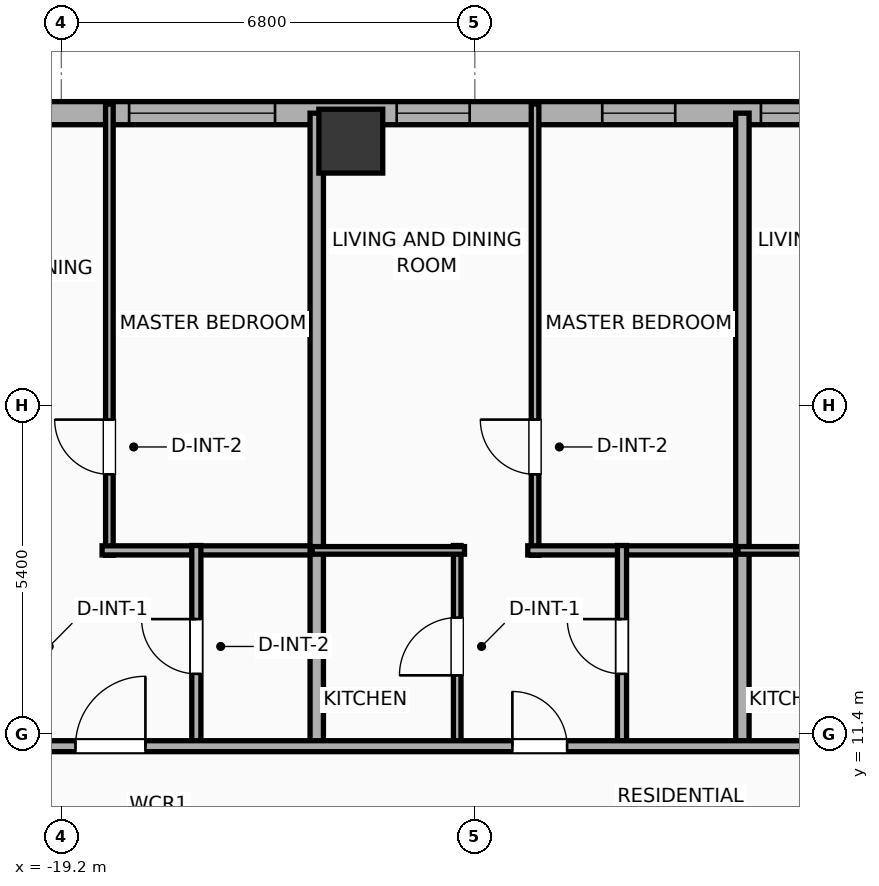
"""IFC4 building model, lengths in metres.
Left out: names, types, materials, properties, quantities, classifications, styles, units other than length and angle.
Written with IfcOpenShell. Run it as: python <this file> out.ifc"""

import sys

from ifc_helpers import new_model, si_unit, direction, frame, frame_2d, origin, origin_2d, place, context, subcontext, project, spatial, rectangle, hollow_rectangle, extrude, element, fill, save


model = new_model("IFC4")
c1 = context("Model", 3, precision=1e-05, world=origin(), true_north=direction((0.0, 1.0)))
c2 = subcontext(c1, "Body", "Model", "MODEL_VIEW")
j1 = project(units=[si_unit("LENGTHUNIT", "METRE"), si_unit("PLANEANGLEUNIT", "RADIAN")], contexts=[c1])
p1 = place(None, origin())
s1 = spatial("IfcSite", under=j1, at=p1, CompositionType="ELEMENT")
p2 = place(p1, origin())
s2 = spatial("IfcBuilding", under=s1, at=p2, CompositionType="ELEMENT")
p3 = place(p2, frame((0.0, 0.0, 120.9)))
s3 = spatial("IfcBuildingStorey", under=s2, at=p3, CompositionType="ELEMENT", Elevation=120.9)
p4 = place(p3, frame((-14.44, 21.15, 0.0), z_axis=(0.0, 0.0, 1.0), x_axis=(1.0, 0.0, 0.0)))
e1 = element("IfcColumn", 1, at=p4, inside=s3, PredefinedType="COLUMN", context=c2, shape_type="SweptSolid", body=[
    extrude(hollow_rectangle(XDim=1.05, YDim=1.05, WallThickness=0.036, at=origin_2d()), origin(), (0.0, 0.0, 1.0), 3.9),
])
p5 = place(p3, frame((-25.381, 21.61, 0.0), z_axis=(0.0, 0.0, 1.0), x_axis=(1.0, 0.0, 0.0)))
e2 = element("IfcWall", 2, at=p5, inside=s3, PredefinedType="ELEMENTEDWALL", context=c2, shape_type="SweptSolid", body=[
    extrude(rectangle(XDim=54.763, YDim=0.38, at=frame_2d((27.381, 0.0))), origin(), (0.0, 0.0, 1.0), 3.65),
])
p6 = place(p5, frame((7.295, 0.0, 0.75)))
e3 = element("IfcOpeningElement", 3, at=p6, cuts=e2, PredefinedType="OPENING", context=c2, shape_type="SweptSolid", body=[
    extrude(rectangle(XDim=2.4, YDim=2.1, at=frame_2d((1.2, 1.05))), frame((0.0, 0.2, 0.0), z_axis=(0.0, -1.0, 0.0), x_axis=(1.0, 0.0, 0.0)), (0.0, 0.0, 1.0), 0.4),
])
p7 = place(p5, frame((17.686, 0.0, 0.75)))
e4 = element("IfcOpeningElement", 4, at=p7, cuts=e2, PredefinedType="OPENING", context=c2, shape_type="SweptSolid", body=[
    extrude(rectangle(XDim=2.4, YDim=2.1, at=frame_2d((1.2, 1.05))), frame((0.0, 0.2, 0.0), z_axis=(0.0, -1.0, 0.0), x_axis=(1.0, 0.0, 0.0)), (0.0, 0.0, 1.0), 0.4),
])
p8 = place(p5, frame((45.867, 0.0, 0.75)))
e5 = element("IfcOpeningElement", 5, at=p8, cuts=e2, PredefinedType="OPENING", context=c2, shape_type="SweptSolid", body=[
    extrude(rectangle(XDim=2.4, YDim=2.1, at=frame_2d((1.2, 1.05))), frame((0.0, 0.2, 0.0), z_axis=(0.0, -1.0, 0.0), x_axis=(1.0, 0.0, 0.0)), (0.0, 0.0, 1.0), 0.4),
])
p9 = place(p5, frame((1.481, 0.0, 0.75)))
e6 = element("IfcOpeningElement", 6, at=p9, cuts=e2, PredefinedType="OPENING", context=c2, shape_type="SweptSolid", body=[
    extrude(rectangle(XDim=1.2, YDim=2.05, at=frame_2d((0.6, 1.025))), frame((0.0, 0.2, 0.0), z_axis=(0.0, -1.0, 0.0), x_axis=(1.0, 0.0, 0.0)), (0.0, 0.0, 1.0), 0.4),
])
p10 = place(p5, frame((4.522, 0.0, 0.75)))
e7 = element("IfcOpeningElement", 7, at=p10, cuts=e2, PredefinedType="OPENING", context=c2, shape_type="SweptSolid", body=[
    extrude(rectangle(XDim=1.2, YDim=2.05, at=frame_2d((0.6, 1.025))), frame((0.0, 0.2, 0.0), z_axis=(0.0, -1.0, 0.0), x_axis=(1.0, 0.0, 0.0)), (0.0, 0.0, 1.0), 0.4),
])
p11 = place(p5, frame((11.696, 0.0, 0.75)))
e8 = element("IfcOpeningElement", 8, at=p11, cuts=e2, PredefinedType="OPENING", context=c2, shape_type="SweptSolid", body=[
    extrude(rectangle(XDim=1.2, YDim=2.05, at=frame_2d((0.6, 1.025))), frame((0.0, 0.2, 0.0), z_axis=(0.0, -1.0, 0.0), x_axis=(1.0, 0.0, 0.0)), (0.0, 0.0, 1.0), 0.4),
])
p12 = place(p5, frame((15.076, 0.0, 0.75)))
e9 = element("IfcOpeningElement", 9, at=p12, cuts=e2, PredefinedType="OPENING", context=c2, shape_type="SweptSolid", body=[
    extrude(rectangle(XDim=1.2, YDim=2.05, at=frame_2d((0.6, 1.025))), frame((0.0, 0.2, 0.0), z_axis=(0.0, -1.0, 0.0), x_axis=(1.0, 0.0, 0.0)), (0.0, 0.0, 1.0), 0.4),
])
p13 = place(p5, frame((22.676, 0.0, 0.75)))
e10 = element("IfcOpeningElement", 10, at=p13, cuts=e2, PredefinedType="OPENING", context=c2, shape_type="SweptSolid", body=[
    extrude(rectangle(XDim=1.2, YDim=2.05, at=frame_2d((0.6, 1.025))), frame((0.0, 0.2, 0.0), z_axis=(0.0, -1.0, 0.0), x_axis=(1.0, 0.0, 0.0)), (0.0, 0.0, 1.0), 0.4),
])
p14 = place(p5, frame((25.576, 0.0, 0.75)))
e11 = element("IfcOpeningElement", 11, at=p14, cuts=e2, PredefinedType="OPENING", context=c2, shape_type="SweptSolid", body=[
    extrude(rectangle(XDim=1.2, YDim=2.05, at=frame_2d((0.6, 1.025))), frame((0.0, 0.2, 0.0), z_axis=(0.0, -1.0, 0.0), x_axis=(1.0, 0.0, 0.0)), (0.0, 0.0, 1.0), 0.4),
])
p15 = place(p5, frame((29.076, 0.0, 0.75)))
e12 = element("IfcOpeningElement", 12, at=p15, cuts=e2, PredefinedType="OPENING", context=c2, shape_type="SweptSolid", body=[
    extrude(rectangle(XDim=1.2, YDim=2.05, at=frame_2d((0.6, 1.025))), frame((0.0, 0.2, 0.0), z_axis=(0.0, -1.0, 0.0), x_axis=(1.0, 0.0, 0.0)), (0.0, 0.0, 1.0), 0.4),
])
p16 = place(p5, frame((33.591, 0.0, 0.75)))
e13 = element("IfcOpeningElement", 13, at=p16, cuts=e2, PredefinedType="OPENING", context=c2, shape_type="SweptSolid", body=[
    extrude(rectangle(XDim=0.85, YDim=2.05, at=frame_2d((0.425, 1.025))), frame((0.0, 0.2, 0.0), z_axis=(0.0, -1.0, 0.0), x_axis=(1.0, 0.0, 0.0)), (0.0, 0.0, 1.0), 0.4),
])
p17 = place(p5, frame((36.076, 0.0, 0.75)))
e14 = element("IfcOpeningElement", 14, at=p17, cuts=e2, PredefinedType="OPENING", context=c2, shape_type="SweptSolid", body=[
    extrude(rectangle(XDim=1.2, YDim=2.05, at=frame_2d((0.6, 1.025))), frame((0.0, 0.2, 0.0), z_axis=(0.0, -1.0, 0.0), x_axis=(1.0, 0.0, 0.0)), (0.0, 0.0, 1.0), 0.4),
])
p18 = place(p5, frame((39.446, 0.0, 0.75)))
e15 = element("IfcOpeningElement", 15, at=p18, cuts=e2, PredefinedType="OPENING", context=c2, shape_type="SweptSolid", body=[
    extrude(rectangle(XDim=1.2, YDim=2.05, at=frame_2d((0.6, 1.025))), frame((0.0, 0.2, 0.0), z_axis=(0.0, -1.0, 0.0), x_axis=(1.0, 0.0, 0.0)), (0.0, 0.0, 1.0), 0.4),
])
p19 = place(p5, frame((42.27, 0.0, 0.75)))
e16 = element("IfcOpeningElement", 16, at=p19, cuts=e2, PredefinedType="OPENING", context=c2, shape_type="SweptSolid", body=[
    extrude(rectangle(XDim=0.85, YDim=2.05, at=frame_2d((0.425, 1.025))), frame((0.0, 0.2, 0.0), z_axis=(0.0, -1.0, 0.0), x_axis=(1.0, 0.0, 0.0)), (0.0, 0.0, 1.0), 0.4),
])
p20 = place(p5, frame((49.554, 0.0, 0.75)))
e17 = element("IfcOpeningElement", 17, at=p20, cuts=e2, PredefinedType="OPENING", context=c2, shape_type="SweptSolid", body=[
    extrude(rectangle(XDim=1.2, YDim=2.05, at=frame_2d((0.6, 1.025))), frame((0.0, 0.2, 0.0), z_axis=(0.0, -1.0, 0.0), x_axis=(1.0, 0.0, 0.0)), (0.0, 0.0, 1.0), 0.4),
])
p21 = place(p5, frame((52.266, 0.0, 0.75)))
e18 = element("IfcOpeningElement", 18, at=p21, cuts=e2, PredefinedType="OPENING", context=c2, shape_type="SweptSolid", body=[
    extrude(rectangle(XDim=1.2, YDim=2.05, at=frame_2d((0.6, 1.025))), frame((0.0, 0.2, 0.0), z_axis=(0.0, -1.0, 0.0), x_axis=(1.0, 0.0, 0.0)), (0.0, 0.0, 1.0), 0.4),
])
p22 = place(p3, frame((-18.41, 14.34, 0.0), z_axis=(0.0, 0.0, 1.0), x_axis=(0.0, 1.0, 0.0)))
e19 = element("IfcWall", 19, at=p22, inside=s3, PredefinedType="PARTITIONING", context=c2, shape_type="SweptSolid", body=[
    extrude(rectangle(XDim=7.42, YDim=0.125, at=frame_2d((3.71, 0.0))), origin(), (0.0, 0.0, 1.0), 3.65),
])
p23 = place(p22, frame((1.331, 0.0, 0.0)))
e20 = element("IfcOpeningElement", 20, at=p23, cuts=e19, PredefinedType="OPENING", context=c2, shape_type="SweptSolid", body=[
    extrude(rectangle(XDim=0.9, YDim=2.05, at=frame_2d((0.45, 1.025))), frame((0.0, 0.073, 0.0), z_axis=(0.0, -1.0, 0.0), x_axis=(1.0, 0.0, 0.0)), (0.0, 0.0, 1.0), 0.145),
])
p24 = place(p3, frame((-18.53, 14.42, 0.0), z_axis=(0.0, 0.0, 1.0), x_axis=(1.0, 0.0, 0.0)))
e21 = element("IfcWall", 21, at=p24, inside=s3, PredefinedType="PLUMBINGWALL", context=c2, shape_type="SweptSolid", body=[
    extrude(rectangle(XDim=3.605, YDim=0.15, at=frame_2d((1.802, 0.0))), origin(), (0.0, 0.0, 1.0), 3.65),
])
p25 = place(p3, frame((-16.98, 11.18, 0.0), z_axis=(0.0, 0.0, 1.0), x_axis=(0.0, 1.0, 0.0)))
e22 = element("IfcWall", 22, at=p25, inside=s3, PredefinedType="PLUMBINGWALL", context=c2, shape_type="SweptSolid", body=[
    extrude(rectangle(XDim=3.32, YDim=0.15, at=frame_2d((1.66, 0.0))), origin(), (0.0, 0.0, 1.0), 3.65),
])
p26 = place(p25, frame((1.21, 0.0, 0.0)))
e23 = element("IfcOpeningElement", 23, at=p26, cuts=e22, PredefinedType="OPENING", context=c2, shape_type="SweptSolid", body=[
    extrude(rectangle(XDim=0.9, YDim=2.05, at=frame_2d((0.45, 1.025))), frame((0.0, 0.085, 0.0), z_axis=(0.0, -1.0, 0.0), x_axis=(1.0, 0.0, 0.0)), (0.0, 0.0, 1.0), 0.17),
])
p27 = place(p3, frame((-15.0, 11.12, 0.0), z_axis=(0.0, 0.0, 1.0), x_axis=(0.0, 1.0, 0.0)))
e24 = element("IfcWall", 24, at=p27, inside=s3, PredefinedType="PARTITIONING", context=c2, shape_type="SweptSolid", body=[
    extrude(rectangle(XDim=10.49, YDim=0.22, at=frame_2d((5.245, 0.0))), origin(), (0.0, 0.0, 1.0), 3.04),
])
p28 = place(p3, frame((-11.41, 14.34, 0.0), z_axis=(0.0, 0.0, 1.0), x_axis=(0.0, 1.0, 0.0)))
e25 = element("IfcWall", 25, at=p28, inside=s3, PredefinedType="PARTITIONING", context=c2, shape_type="SweptSolid", body=[
    extrude(rectangle(XDim=7.42, YDim=0.125, at=frame_2d((3.71, 0.0))), origin(), (0.0, 0.0, 1.0), 3.65),
])
p29 = place(p28, frame((1.331, 0.0, 0.0)))
e26 = element("IfcOpeningElement", 26, at=p29, cuts=e25, PredefinedType="OPENING", context=c2, shape_type="SweptSolid", body=[
    extrude(rectangle(XDim=0.9, YDim=2.05, at=frame_2d((0.45, 1.025))), frame((0.0, 0.073, 0.0), z_axis=(0.0, -1.0, 0.0), x_axis=(1.0, 0.0, 0.0)), (0.0, 0.0, 1.0), 0.145),
])
p30 = place(p3, frame((-11.53, 14.42, 0.0), z_axis=(0.0, 0.0, 1.0), x_axis=(1.0, 0.0, 0.0)))
e27 = element("IfcWall", 27, at=p30, inside=s3, PredefinedType="PLUMBINGWALL", context=c2, shape_type="SweptSolid", body=[
    extrude(rectangle(XDim=3.605, YDim=0.15, at=frame_2d((1.802, 0.0))), origin(), (0.0, 0.0, 1.0), 3.65),
])
p31 = place(p3, frame((-12.69, 11.18, 0.0), z_axis=(0.0, 0.0, 1.0), x_axis=(0.0, 1.0, 0.0)))
e28 = element("IfcWall", 28, at=p31, inside=s3, PredefinedType="PARTITIONING", context=c2, shape_type="SweptSolid", body=[
    extrude(rectangle(XDim=3.32, YDim=0.125, at=frame_2d((1.66, 0.0))), origin(), (0.0, 0.0, 1.0), 3.65),
])
p32 = place(p31, frame((1.185, 0.0, 0.0)))
e29 = element("IfcOpeningElement", 29, at=p32, cuts=e28, PredefinedType="OPENING", context=c2, shape_type="SweptSolid", body=[
    extrude(rectangle(XDim=0.95, YDim=2.05, at=frame_2d((0.475, 1.025))), frame((0.0, 0.073, 0.0), z_axis=(0.0, -1.0, 0.0), x_axis=(1.0, 0.0, 0.0)), (0.0, 0.0, 1.0), 0.145),
])
p33 = place(p3, frame((-15.075, 14.42, 0.0), z_axis=(0.0, 0.0, 1.0), x_axis=(1.0, 0.0, 0.0)))
e30 = element("IfcWall", 30, at=p33, inside=s3, PredefinedType="PARTITIONING", context=c2, shape_type="SweptSolid", body=[
    extrude(rectangle(XDim=2.505, YDim=0.125, at=frame_2d((1.252, 0.0))), origin(), (0.0, 0.0, 1.0), 3.65),
])
p34 = place(p3, frame((-9.98, 11.18, 0.0), z_axis=(0.0, 0.0, 1.0), x_axis=(0.0, 1.0, 0.0)))
e31 = element("IfcWall", 31, at=p34, inside=s3, PredefinedType="PLUMBINGWALL", context=c2, shape_type="SweptSolid", body=[
    extrude(rectangle(XDim=3.32, YDim=0.15, at=frame_2d((1.66, 0.0))), origin(), (0.0, 0.0, 1.0), 3.65),
])
p35 = place(p34, frame((1.21, 0.0, 0.0)))
e32 = element("IfcOpeningElement", 32, at=p35, cuts=e31, PredefinedType="OPENING", context=c2, shape_type="SweptSolid", body=[
    extrude(rectangle(XDim=0.9, YDim=2.05, at=frame_2d((0.45, 1.025))), frame((0.0, 0.085, 0.0), z_axis=(0.0, -1.0, 0.0), x_axis=(1.0, 0.0, 0.0)), (0.0, 0.0, 1.0), 0.17),
])
p36 = place(p3, frame((-8.0, 11.12, 0.0), z_axis=(0.0, 0.0, 1.0), x_axis=(0.0, 1.0, 0.0)))
e33 = element("IfcWall", 33, at=p36, inside=s3, PredefinedType="PARTITIONING", context=c2, shape_type="SweptSolid", body=[
    extrude(rectangle(XDim=10.49, YDim=0.22, at=frame_2d((5.245, 0.0))), origin(), (0.0, 0.0, 1.0), 3.65),
])
p37 = place(p3, frame((-8.075, 14.42, 0.0), z_axis=(0.0, 0.0, 1.0), x_axis=(1.0, 0.0, 0.0)))
e34 = element("IfcWall", 34, at=p37, inside=s3, PredefinedType="PARTITIONING", context=c2, shape_type="SweptSolid", body=[
    extrude(rectangle(XDim=2.505, YDim=0.125, at=frame_2d((1.252, 0.0))), origin(), (0.0, 0.0, 1.0), 3.65),
])
p38 = place(p3, frame((-29.21, 11.2, 0.0), z_axis=(0.0, 0.0, 1.0), x_axis=(1.0, 0.0, 0.0)))
e35 = element("IfcWall", 35, at=p38, inside=s3, PredefinedType="PARTITIONING", context=c2, shape_type="SweptSolid", body=[
    extrude(rectangle(XDim=62.42, YDim=0.18, at=frame_2d((31.21, 0.0))), origin(), (0.0, 0.0, 1.0), 3.65),
])
p39 = place(p38, frame((3.108, 0.0, 0.0)))
e36 = element("IfcOpeningElement", 36, at=p39, cuts=e35, PredefinedType="OPENING", context=c2, shape_type="SweptSolid", body=[
    extrude(rectangle(XDim=1.15, YDim=2.05, at=frame_2d((0.575, 1.025))), frame((0.0, 0.1, 0.0), z_axis=(0.0, -1.0, 0.0), x_axis=(1.0, 0.0, 0.0)), (0.0, 0.0, 1.0), 0.2),
])
p40 = place(p38, frame((10.242, 0.0, 0.0)))
e37 = element("IfcOpeningElement", 37, at=p40, cuts=e35, PredefinedType="OPENING", context=c2, shape_type="SweptSolid", body=[
    extrude(rectangle(XDim=1.15, YDim=2.05, at=frame_2d((0.575, 1.025))), frame((0.0, 0.1, 0.0), z_axis=(0.0, -1.0, 0.0), x_axis=(1.0, 0.0, 0.0)), (0.0, 0.0, 1.0), 0.2),
])
p41 = place(p38, frame((17.427, 0.0, 0.0)))
e38 = element("IfcOpeningElement", 38, at=p41, cuts=e35, PredefinedType="OPENING", context=c2, shape_type="SweptSolid", body=[
    extrude(rectangle(XDim=0.9, YDim=2.05, at=frame_2d((0.45, 1.025))), frame((0.0, 0.1, 0.0), z_axis=(0.0, -1.0, 0.0), x_axis=(1.0, 0.0, 0.0)), (0.0, 0.0, 1.0), 0.2),
])
p42 = place(p38, frame((24.424, 0.0, 0.0)))
e39 = element("IfcOpeningElement", 39, at=p42, cuts=e35, PredefinedType="OPENING", context=c2, shape_type="SweptSolid", body=[
    extrude(rectangle(XDim=0.9, YDim=2.05, at=frame_2d((0.45, 1.025))), frame((0.0, 0.1, 0.0), z_axis=(0.0, -1.0, 0.0), x_axis=(1.0, 0.0, 0.0)), (0.0, 0.0, 1.0), 0.2),
])
p43 = place(p38, frame((31.428, 0.0, 0.0)))
e40 = element("IfcOpeningElement", 40, at=p43, cuts=e35, PredefinedType="OPENING", context=c2, shape_type="SweptSolid", body=[
    extrude(rectangle(XDim=0.9, YDim=2.05, at=frame_2d((0.45, 1.025))), frame((0.0, 0.1, 0.0), z_axis=(0.0, -1.0, 0.0), x_axis=(1.0, 0.0, 0.0)), (0.0, 0.0, 1.0), 0.2),
])
p44 = place(p38, frame((38.425, 0.0, 0.0)))
e41 = element("IfcOpeningElement", 41, at=p44, cuts=e35, PredefinedType="OPENING", context=c2, shape_type="SweptSolid", body=[
    extrude(rectangle(XDim=0.9, YDim=2.05, at=frame_2d((0.45, 1.025))), frame((0.0, 0.1, 0.0), z_axis=(0.0, -1.0, 0.0), x_axis=(1.0, 0.0, 0.0)), (0.0, 0.0, 1.0), 0.2),
])
p45 = place(p38, frame((45.298, 0.0, 0.0)))
e42 = element("IfcOpeningElement", 42, at=p45, cuts=e35, PredefinedType="OPENING", context=c2, shape_type="SweptSolid", body=[
    extrude(rectangle(XDim=0.9, YDim=2.05, at=frame_2d((0.45, 1.025))), frame((0.0, 0.1, 0.0), z_axis=(0.0, -1.0, 0.0), x_axis=(1.0, 0.0, 0.0)), (0.0, 0.0, 1.0), 0.2),
])
p46 = place(p38, frame((52.033, 0.0, 0.0)))
e43 = element("IfcOpeningElement", 43, at=p46, cuts=e35, PredefinedType="OPENING", context=c2, shape_type="SweptSolid", body=[
    extrude(rectangle(XDim=0.9, YDim=2.05, at=frame_2d((0.45, 1.025))), frame((0.0, 0.1, 0.0), z_axis=(0.0, -1.0, 0.0), x_axis=(1.0, 0.0, 0.0)), (0.0, 0.0, 1.0), 0.2),
])
p47 = place(p38, frame((58.805, 0.0, 0.0)))
e44 = element("IfcOpeningElement", 44, at=p47, cuts=e35, PredefinedType="OPENING", context=c2, shape_type="SweptSolid", body=[
    extrude(rectangle(XDim=0.9, YDim=2.05, at=frame_2d((0.45, 1.025))), frame((0.0, 0.1, 0.0), z_axis=(0.0, -1.0, 0.0), x_axis=(1.0, 0.0, 0.0)), (0.0, 0.0, 1.0), 0.2),
])
p48 = place(p6, origin())
e45 = element("IfcWindow", 45, at=p48, inside=s3, PartitioningType="SINGLE_PANEL", PredefinedType="WINDOW", context=c2, shape_type="SweptSolid", body=[
    extrude(rectangle(XDim=2.4, YDim=2.1, at=frame_2d((1.2, 1.05))), frame((0.0, 0.03, 0.0), z_axis=(0.0, -1.0, 0.0), x_axis=(1.0, 0.0, 0.0)), (0.0, 0.0, 1.0), 0.06),
])
fill(e3, e45)
p49 = place(p7, origin())
e46 = element("IfcWindow", 46, at=p49, inside=s3, PartitioningType="SINGLE_PANEL", PredefinedType="WINDOW", context=c2, shape_type="SweptSolid", body=[
    extrude(rectangle(XDim=2.4, YDim=2.1, at=frame_2d((1.2, 1.05))), frame((0.0, 0.03, 0.0), z_axis=(0.0, -1.0, 0.0), x_axis=(1.0, 0.0, 0.0)), (0.0, 0.0, 1.0), 0.06),
])
fill(e4, e46)
p50 = place(p11, origin())
e47 = element("IfcWindow", 47, at=p50, inside=s3, PartitioningType="SINGLE_PANEL", PredefinedType="WINDOW", context=c2, shape_type="SweptSolid", body=[
    extrude(rectangle(XDim=1.2, YDim=2.05, at=frame_2d((0.6, 1.025))), frame((0.0, 0.03, 0.0), z_axis=(0.0, -1.0, 0.0), x_axis=(1.0, 0.0, 0.0)), (0.0, 0.0, 1.0), 0.06),
])
fill(e8, e47)
p51 = place(p12, origin())
e48 = element("IfcWindow", 48, at=p51, inside=s3, PartitioningType="SINGLE_PANEL", PredefinedType="WINDOW", context=c2, shape_type="SweptSolid", body=[
    extrude(rectangle(XDim=1.2, YDim=2.05, at=frame_2d((0.6, 1.025))), frame((0.0, 0.03, 0.0), z_axis=(0.0, -1.0, 0.0), x_axis=(1.0, 0.0, 0.0)), (0.0, 0.0, 1.0), 0.06),
])
fill(e9, e48)
p52 = place(p23, origin())
e49 = element("IfcDoor", 49, at=p52, inside=s3, OperationType="SINGLE_SWING_RIGHT", PredefinedType="DOOR", context=c2, shape_type="SweptSolid", body=[
    extrude(rectangle(XDim=0.9, YDim=2.05, at=frame_2d((0.45, 1.025))), frame((0.0, 0.025, 0.0), z_axis=(0.0, -1.0, 0.0), x_axis=(1.0, 0.0, 0.0)), (0.0, 0.0, 1.0), 0.05),
])
fill(e20, e49)
p53 = place(p26, origin())
e50 = element("IfcDoor", 50, at=p53, inside=s3, OperationType="SINGLE_SWING_RIGHT", PredefinedType="DOOR", context=c2, shape_type="SweptSolid", body=[
    extrude(rectangle(XDim=0.9, YDim=2.05, at=frame_2d((0.45, 1.025))), frame((0.0, 0.025, 0.0), z_axis=(0.0, -1.0, 0.0), x_axis=(1.0, 0.0, 0.0)), (0.0, 0.0, 1.0), 0.05),
])
fill(e23, e50)
p54 = place(p29, origin())
e51 = element("IfcDoor", 51, at=p54, inside=s3, OperationType="SINGLE_SWING_RIGHT", PredefinedType="DOOR", context=c2, shape_type="SweptSolid", body=[
    extrude(rectangle(XDim=0.9, YDim=2.05, at=frame_2d((0.45, 1.025))), frame((0.0, 0.025, 0.0), z_axis=(0.0, -1.0, 0.0), x_axis=(1.0, 0.0, 0.0)), (0.0, 0.0, 1.0), 0.05),
])
fill(e26, e51)
p55 = place(p32, origin())
e52 = element("IfcDoor", 52, at=p55, inside=s3, OperationType="SINGLE_SWING_LEFT", PredefinedType="DOOR", context=c2, shape_type="SweptSolid", body=[
    extrude(rectangle(XDim=0.95, YDim=2.05, at=frame_2d((0.475, 1.025))), frame((0.0, 0.025, 0.0), z_axis=(0.0, -1.0, 0.0), x_axis=(1.0, 0.0, 0.0)), (0.0, 0.0, 1.0), 0.05),
])
fill(e29, e52)
p56 = place(p35, origin())
e53 = element("IfcDoor", 53, at=p56, inside=s3, OperationType="SINGLE_SWING_RIGHT", PredefinedType="DOOR", context=c2, shape_type="SweptSolid", body=[
    extrude(rectangle(XDim=0.9, YDim=2.05, at=frame_2d((0.45, 1.025))), frame((0.0, 0.025, 0.0), z_axis=(0.0, -1.0, 0.0), x_axis=(1.0, 0.0, 0.0)), (0.0, 0.0, 1.0), 0.05),
])
fill(e32, e53)
p57 = place(p40, origin())
e54 = element("IfcDoor", 54, at=p57, inside=s3, OperationType="SINGLE_SWING_RIGHT", PredefinedType="DOOR", context=c2, shape_type="SweptSolid", body=[
    extrude(rectangle(XDim=1.15, YDim=2.05, at=frame_2d((0.575, 1.025))), frame((0.0, 0.025, 0.0), z_axis=(0.0, -1.0, 0.0), x_axis=(1.0, 0.0, 0.0)), (0.0, 0.0, 1.0), 0.05),
])
fill(e37, e54)
p58 = place(p41, origin())
e55 = element("IfcDoor", 55, at=p58, inside=s3, OperationType="SINGLE_SWING_LEFT", PredefinedType="DOOR", context=c2, shape_type="SweptSolid", body=[
    extrude(rectangle(XDim=0.9, YDim=2.05, at=frame_2d((0.45, 1.025))), frame((0.0, 0.025, 0.0), z_axis=(0.0, -1.0, 0.0), x_axis=(1.0, 0.0, 0.0)), (0.0, 0.0, 1.0), 0.05),
])
fill(e38, e55)
save(model, sys.argv[1])
